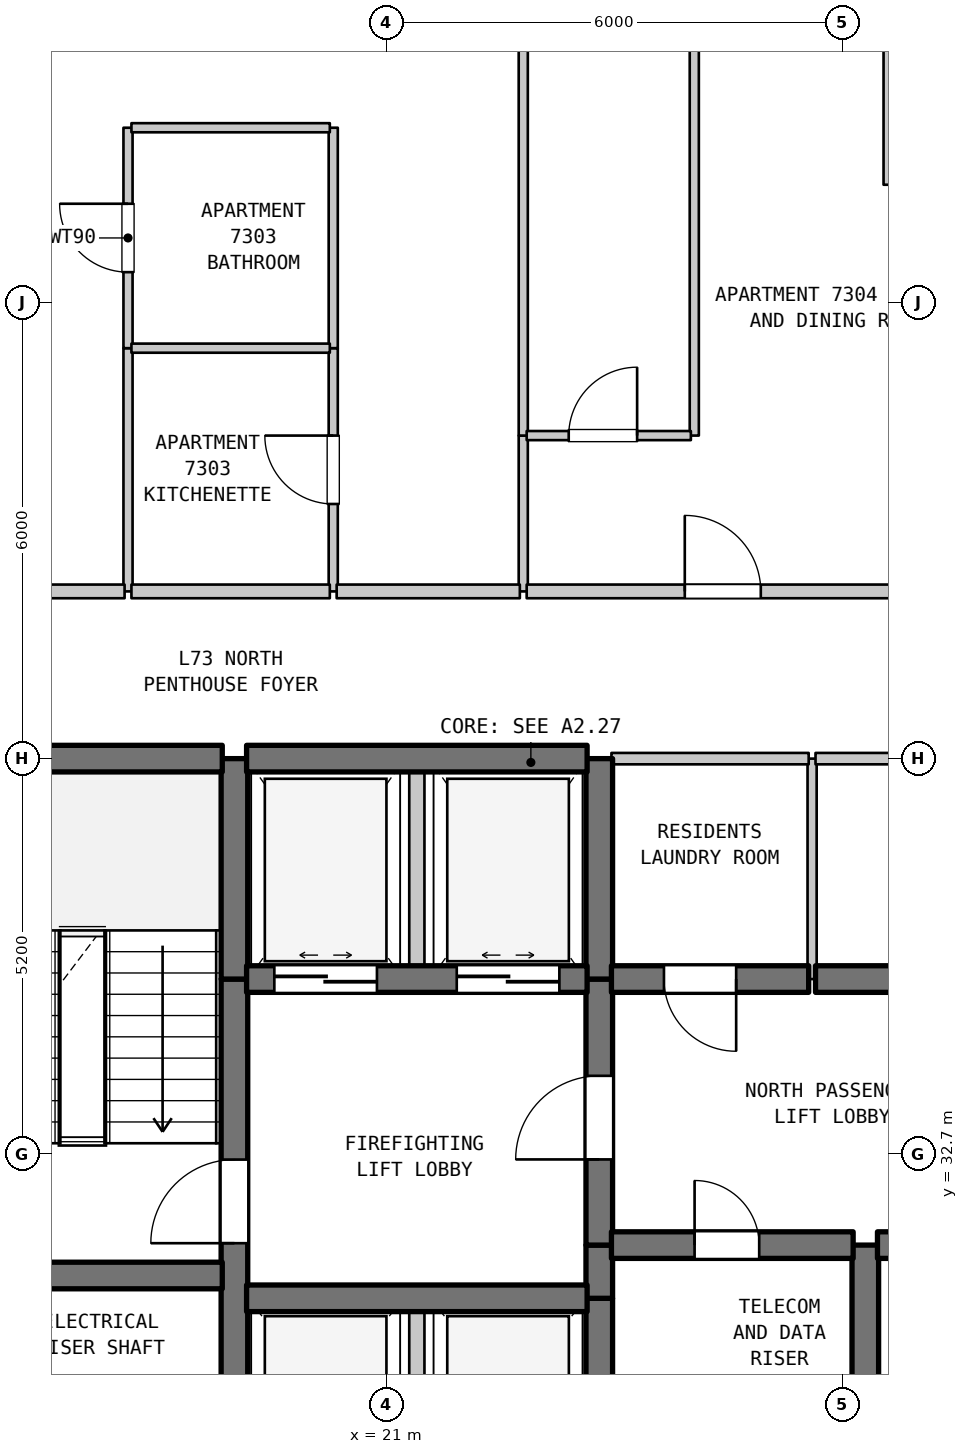
"""IFC4 building model, lengths in metres.
Left out: names, types, materials, properties, quantities, classifications, styles, units other than length and angle.
Written with IfcOpenShell. Run it as: python <this file> out.ifc"""

import sys

from ifc_helpers import new_model, si_unit, direction, frame, frame_2d, origin, place, context, subcontext, project, spatial, rectangle, extrude, element, fill, save


model = new_model("IFC4")
c1 = context("Model", 3, precision=1e-05, world=origin(), true_north=direction((0.0, 1.0)))
c2 = subcontext(c1, "Body", "Model", "MODEL_VIEW")
j1 = project(units=[si_unit("LENGTHUNIT", "METRE"), si_unit("PLANEANGLEUNIT", "RADIAN")], contexts=[c1])
p1 = place(None, origin())
s1 = spatial("IfcSite", under=j1, at=p1, CompositionType="ELEMENT")
p2 = place(p1, origin())
s2 = spatial("IfcBuilding", under=s1, at=p2, CompositionType="ELEMENT")
p3 = place(p2, frame((0.0, 0.0, 291.7)))
s3 = spatial("IfcBuildingStorey", under=s2, at=p3, CompositionType="ELEMENT", Elevation=291.7)
p4 = place(p3, frame((17.6, 40.1, 0.0), z_axis=(0.0, 0.0, 1.0), x_axis=(0.0, 1.0, 0.0)))
e1 = element("IfcWall", 1, at=p4, inside=s3, PredefinedType="PARTITIONING", context=c2, shape_type="SweptSolid", body=[
    extrude(rectangle(XDim=3.2, YDim=0.12, at=frame_2d((1.6, 0.0))), origin(), (0.0, 0.0, 1.0), 3.39),
])
p5 = place(p3, frame((17.6, 43.3, 0.0), z_axis=(0.0, 0.0, 1.0), x_axis=(0.0, 1.0, 0.0)))
e2 = element("IfcWall", 2, at=p5, inside=s3, PredefinedType="PARTITIONING", context=c2, shape_type="SweptSolid", body=[
    extrude(rectangle(XDim=2.9, YDim=0.12, at=frame_2d((1.45, 0.0))), origin(), (0.0, 0.0, 1.0), 3.39),
])
p6 = place(p5, frame((1.0, 0.0, 0.0)))
e3 = element("IfcOpeningElement", 3, at=p6, cuts=e2, PredefinedType="OPENING", context=c2, shape_type="SweptSolid", body=[
    extrude(rectangle(XDim=0.9, YDim=2.1, at=frame_2d((0.45, 1.05))), frame((0.0, 0.07, 0.0), z_axis=(0.0, -1.0, 0.0), x_axis=(1.0, 0.0, 0.0)), (0.0, 0.0, 1.0), 0.14),
])
p7 = place(p3, frame((19.0, 29.5, 0.0), z_axis=(0.0, 0.0, 1.0), x_axis=(0.0, 1.0, 0.0)))
e4 = element("IfcWall", 4, at=p7, inside=s3, PredefinedType="SHEAR", context=c2, shape_type="SweptSolid", body=[
    extrude(rectangle(XDim=5.5, YDim=0.35, at=frame_2d((2.75, 0.0))), origin(), (0.0, 0.0, 1.0), 3.39),
])
p8 = place(p7, frame((2.025, 0.0, 0.0)))
e5 = element("IfcOpeningElement", 5, at=p8, cuts=e4, PredefinedType="OPENING", context=c2, shape_type="SweptSolid", body=[
    extrude(rectangle(XDim=1.1, YDim=2.15, at=frame_2d((0.55, 1.075))), frame((0.0, 0.185, 0.0), z_axis=(0.0, -1.0, 0.0), x_axis=(1.0, 0.0, 0.0)), (0.0, 0.0, 1.0), 0.37),
])
p9 = place(p3, frame((19.0, 35.0, 0.0), z_axis=(0.0, 0.0, 1.0), x_axis=(0.0, 1.0, 0.0)))
e6 = element("IfcWall", 6, at=p9, inside=s3, PredefinedType="SHEAR", context=c2, shape_type="SweptSolid", body=[
    extrude(rectangle(XDim=2.9, YDim=0.35, at=frame_2d((1.45, 0.0))), origin(), (0.0, 0.0, 1.0), 3.39),
])
p10 = place(p3, frame((20.3, 40.1, 0.0), z_axis=(0.0, 0.0, 1.0), x_axis=(0.0, 1.0, 0.0)))
e7 = element("IfcWall", 7, at=p10, inside=s3, PredefinedType="PARTITIONING", context=c2, shape_type="SweptSolid", body=[
    extrude(rectangle(XDim=3.2, YDim=0.12, at=frame_2d((1.6, 0.0))), origin(), (0.0, 0.0, 1.0), 3.39),
])
p11 = place(p10, frame((1.15, 0.0, 0.0)))
e8 = element("IfcOpeningElement", 8, at=p11, cuts=e7, PredefinedType="OPENING", context=c2, shape_type="SweptSolid", body=[
    extrude(rectangle(XDim=0.9, YDim=2.15, at=frame_2d((0.45, 1.075))), frame((0.0, 0.07, 0.0), z_axis=(0.0, -1.0, 0.0), x_axis=(1.0, 0.0, 0.0)), (0.0, 0.0, 1.0), 0.14),
])
p12 = place(p3, frame((20.3, 43.3, 0.0), z_axis=(0.0, 0.0, 1.0), x_axis=(0.0, 1.0, 0.0)))
e9 = element("IfcWall", 9, at=p12, inside=s3, PredefinedType="PARTITIONING", context=c2, shape_type="SweptSolid", body=[
    extrude(rectangle(XDim=2.9, YDim=0.12, at=frame_2d((1.45, 0.0))), origin(), (0.0, 0.0, 1.0), 3.39),
])
p13 = place(p3, frame((21.4, 28.2, 0.0), z_axis=(0.0, 0.0, 1.0), x_axis=(0.0, 1.0, 0.0)))
e10 = element("IfcWall", 10, at=p13, inside=s3, PredefinedType="STANDARD", context=c2, shape_type="SweptSolid", body=[
    extrude(rectangle(XDim=2.6, YDim=0.2, at=frame_2d((1.3, 0.0))), origin(), (0.0, 0.0, 1.0), 3.39),
])
p14 = place(p3, frame((21.4, 35.0, 0.0), z_axis=(0.0, 0.0, 1.0), x_axis=(0.0, 1.0, 0.0)))
e11 = element("IfcWall", 11, at=p14, inside=s3, PredefinedType="STANDARD", context=c2, shape_type="SweptSolid", body=[
    extrude(rectangle(XDim=2.9, YDim=0.2, at=frame_2d((1.45, 0.0))), origin(), (0.0, 0.0, 1.0), 3.39),
])
p15 = place(p3, frame((22.8, 40.1, 0.0), z_axis=(0.0, 0.0, 1.0), x_axis=(0.0, 1.0, 0.0)))
e12 = element("IfcWall", 12, at=p15, inside=s3, PredefinedType="PARTITIONING", context=c2, shape_type="SweptSolid", body=[
    extrude(rectangle(XDim=2.05, YDim=0.12, at=frame_2d((1.025, 0.0))), origin(), (0.0, 0.0, 1.0), 3.39),
])
p16 = place(p3, frame((22.8, 42.15, 0.0), z_axis=(0.0, 0.0, 1.0), x_axis=(0.0, 1.0, 0.0)))
e13 = element("IfcWall", 13, at=p16, inside=s3, PredefinedType="PARTITIONING", context=c2, shape_type="SweptSolid", body=[
    extrude(rectangle(XDim=11.74, YDim=0.12, at=frame_2d((5.87, 0.0))), origin(), (0.0, 0.0, 1.0), 3.39),
])
p17 = place(p3, frame((23.8, 28.2, 0.0), z_axis=(0.0, 0.0, 1.0), x_axis=(0.0, 1.0, 0.0)))
e14 = element("IfcWall", 14, at=p17, inside=s3, PredefinedType="SHEAR", context=c2, shape_type="SweptSolid", body=[
    extrude(rectangle(XDim=2.6, YDim=0.35, at=frame_2d((1.3, 0.0))), origin(), (0.0, 0.0, 1.0), 3.39),
])
p18 = place(p3, frame((23.8, 30.8, 0.0), z_axis=(0.0, 0.0, 1.0), x_axis=(0.0, 1.0, 0.0)))
e15 = element("IfcWall", 15, at=p18, inside=s3, PredefinedType="SHEAR", context=c2, shape_type="SweptSolid", body=[
    extrude(rectangle(XDim=0.7, YDim=0.35, at=frame_2d((0.35, 0.0))), origin(), (0.0, 0.0, 1.0), 3.39),
])
p19 = place(p3, frame((23.8, 31.5, 0.0), z_axis=(0.0, 0.0, 1.0), x_axis=(0.0, 1.0, 0.0)))
e16 = element("IfcWall", 16, at=p19, inside=s3, PredefinedType="SHEAR", context=c2, shape_type="SweptSolid", body=[
    extrude(rectangle(XDim=3.5, YDim=0.35, at=frame_2d((1.75, 0.0))), origin(), (0.0, 0.0, 1.0), 3.39),
])
p20 = place(p19, frame((1.127, 0.0, 0.0)))
e17 = element("IfcOpeningElement", 17, at=p20, cuts=e16, PredefinedType="OPENING", context=c2, shape_type="SweptSolid", body=[
    extrude(rectangle(XDim=1.1, YDim=2.15, at=frame_2d((0.55, 1.075))), frame((0.0, 0.185, 0.0), z_axis=(0.0, -1.0, 0.0), x_axis=(1.0, 0.0, 0.0)), (0.0, 0.0, 1.0), 0.37),
])
p21 = place(p3, frame((23.8, 35.0, 0.0), z_axis=(0.0, 0.0, 1.0), x_axis=(0.0, 1.0, 0.0)))
e18 = element("IfcWall", 18, at=p21, inside=s3, PredefinedType="SHEAR", context=c2, shape_type="SweptSolid", body=[
    extrude(rectangle(XDim=2.9, YDim=0.35, at=frame_2d((1.45, 0.0))), origin(), (0.0, 0.0, 1.0), 3.39),
])
p22 = place(p3, frame((25.05, 42.15, 0.0), z_axis=(0.0, 0.0, 1.0), x_axis=(0.0, 1.0, 0.0)))
e19 = element("IfcWall", 19, at=p22, inside=s3, PredefinedType="PARTITIONING", context=c2, shape_type="SweptSolid", body=[
    extrude(rectangle(XDim=11.74, YDim=0.12, at=frame_2d((5.87, 0.0))), origin(), (0.0, 0.0, 1.0), 3.39),
])
p23 = place(p3, frame((26.6, 35.0, 0.0), z_axis=(0.0, 0.0, 1.0), x_axis=(0.0, 1.0, 0.0)))
e20 = element("IfcWall", 20, at=p23, inside=s3, PredefinedType="PARTITIONING", context=c2, shape_type="SweptSolid", body=[
    extrude(rectangle(XDim=2.9, YDim=0.12, at=frame_2d((1.45, 0.0))), origin(), (0.0, 0.0, 1.0), 3.39),
])
p24 = place(p3, frame((27.3, 28.9, 0.0), z_axis=(0.0, 0.0, 1.0), x_axis=(0.0, 1.0, 0.0)))
e21 = element("IfcWall", 21, at=p24, inside=s3, PredefinedType="SHEAR", context=c2, shape_type="SweptSolid", body=[
    extrude(rectangle(XDim=2.6, YDim=0.35, at=frame_2d((1.3, 0.0))), origin(), (0.0, 0.0, 1.0), 3.39),
])
p25 = place(p3, frame((27.6, 45.45, 0.0), z_axis=(0.0, 0.0, 1.0), x_axis=(0.0, 1.0, 0.0)))
e22 = element("IfcWall", 22, at=p25, inside=s3, PredefinedType="PARTITIONING", context=c2, shape_type="SweptSolid", body=[
    extrude(rectangle(XDim=8.44, YDim=0.12, at=frame_2d((4.22, 0.0))), origin(), (0.0, 0.0, 1.0), 3.39),
])
p26 = place(p3, frame((19.16, 30.8, 0.0), z_axis=(0.0, 0.0, 1.0), x_axis=(1.0, 0.0, 0.0)))
e23 = element("IfcWall", 23, at=p26, inside=s3, PredefinedType="SHEAR", context=c2, shape_type="SweptSolid", body=[
    extrude(rectangle(XDim=4.48, YDim=0.35, at=frame_2d((2.24, 0.0))), origin(), (0.0, 0.0, 1.0), 3.39),
])
p27 = place(p3, frame((15.16, 31.1, 0.0), z_axis=(0.0, 0.0, 1.0), x_axis=(1.0, 0.0, 0.0)))
e24 = element("IfcWall", 24, at=p27, inside=s3, PredefinedType="SHEAR", context=c2, shape_type="SweptSolid", body=[
    extrude(rectangle(XDim=3.68, YDim=0.35, at=frame_2d((1.84, 0.0))), origin(), (0.0, 0.0, 1.0), 3.39),
])
p28 = place(p3, frame((23.96, 31.5, 0.0), z_axis=(0.0, 0.0, 1.0), x_axis=(1.0, 0.0, 0.0)))
e25 = element("IfcWall", 25, at=p28, inside=s3, PredefinedType="SHEAR", context=c2, shape_type="SweptSolid", body=[
    extrude(rectangle(XDim=3.18, YDim=0.35, at=frame_2d((1.59, 0.0))), origin(), (0.0, 0.0, 1.0), 3.39),
])
p29 = place(p28, frame((1.094, 0.0, 0.0)))
e26 = element("IfcOpeningElement", 26, at=p29, cuts=e25, PredefinedType="OPENING", context=c2, shape_type="SweptSolid", body=[
    extrude(rectangle(XDim=0.85, YDim=2.1, at=frame_2d((0.425, 1.05))), frame((0.0, 0.185, 0.0), z_axis=(0.0, -1.0, 0.0), x_axis=(1.0, 0.0, 0.0)), (0.0, 0.0, 1.0), 0.37),
])
p30 = place(p3, frame((27.46, 31.5, 0.0), z_axis=(0.0, 0.0, 1.0), x_axis=(1.0, 0.0, 0.0)))
e27 = element("IfcWall", 27, at=p30, inside=s3, PredefinedType="SHEAR", context=c2, shape_type="SweptSolid", body=[
    extrude(rectangle(XDim=3.18, YDim=0.35, at=frame_2d((1.59, 0.0))), origin(), (0.0, 0.0, 1.0), 3.39),
])
p31 = place(p3, frame((19.16, 35.0, 0.0), z_axis=(0.0, 0.0, 1.0), x_axis=(1.0, 0.0, 0.0)))
e28 = element("IfcWall", 28, at=p31, inside=s3, PredefinedType="SHEAR", context=c2, shape_type="SweptSolid", body=[
    extrude(rectangle(XDim=4.48, YDim=0.35, at=frame_2d((2.24, 0.0))), origin(), (0.0, 0.0, 1.0), 3.39),
])
p32 = place(p31, frame((0.365, 0.0, 0.0)))
e29 = element("IfcOpeningElement", 29, at=p32, cuts=e28, PredefinedType="OPENING", context=c2, shape_type="SweptSolid", body=[
    extrude(rectangle(XDim=1.35, YDim=2.2, at=frame_2d((0.675, 1.1))), frame((0.0, 0.185, 0.0), z_axis=(0.0, -1.0, 0.0), x_axis=(1.0, 0.0, 0.0)), (0.0, 0.0, 1.0), 0.37),
])
p33 = place(p31, frame((2.765, 0.0, 0.0)))
e30 = element("IfcOpeningElement", 30, at=p33, cuts=e28, PredefinedType="OPENING", context=c2, shape_type="SweptSolid", body=[
    extrude(rectangle(XDim=1.35, YDim=2.2, at=frame_2d((0.675, 1.1))), frame((0.0, 0.185, 0.0), z_axis=(0.0, -1.0, 0.0), x_axis=(1.0, 0.0, 0.0)), (0.0, 0.0, 1.0), 0.37),
])
p34 = place(p3, frame((23.96, 35.0, 0.0), z_axis=(0.0, 0.0, 1.0), x_axis=(1.0, 0.0, 0.0)))
e31 = element("IfcWall", 31, at=p34, inside=s3, PredefinedType="SHEAR", context=c2, shape_type="SweptSolid", body=[
    extrude(rectangle(XDim=2.595, YDim=0.35, at=frame_2d((1.297, 0.0))), origin(), (0.0, 0.0, 1.0), 3.39),
])
p35 = place(p34, frame((0.691, 0.0, 0.0)))
e32 = element("IfcOpeningElement", 32, at=p35, cuts=e31, PredefinedType="OPENING", context=c2, shape_type="SweptSolid", body=[
    extrude(rectangle(XDim=0.95, YDim=2.15, at=frame_2d((0.475, 1.075))), frame((0.0, 0.185, 0.0), z_axis=(0.0, -1.0, 0.0), x_axis=(1.0, 0.0, 0.0)), (0.0, 0.0, 1.0), 0.37),
])
p36 = place(p3, frame((26.645, 35.0, 0.0), z_axis=(0.0, 0.0, 1.0), x_axis=(1.0, 0.0, 0.0)))
e33 = element("IfcWall", 33, at=p36, inside=s3, PredefinedType="SHEAR", context=c2, shape_type="SweptSolid", body=[
    extrude(rectangle(XDim=3.995, YDim=0.35, at=frame_2d((1.998, 0.0))), origin(), (0.0, 0.0, 1.0), 3.39),
])
p37 = place(p36, frame((1.508, 0.0, 0.0)))
e34 = element("IfcOpeningElement", 34, at=p37, cuts=e33, PredefinedType="OPENING", context=c2, shape_type="SweptSolid", body=[
    extrude(rectangle(XDim=0.95, YDim=2.15, at=frame_2d((0.475, 1.075))), frame((0.0, 0.185, 0.0), z_axis=(0.0, -1.0, 0.0), x_axis=(1.0, 0.0, 0.0)), (0.0, 0.0, 1.0), 0.37),
])
p38 = place(p3, frame((15.16, 37.9, 0.0), z_axis=(0.0, 0.0, 1.0), x_axis=(1.0, 0.0, 0.0)))
e35 = element("IfcWall", 35, at=p38, inside=s3, PredefinedType="SHEAR", context=c2, shape_type="SweptSolid", body=[
    extrude(rectangle(XDim=3.68, YDim=0.35, at=frame_2d((1.84, 0.0))), origin(), (0.0, 0.0, 1.0), 3.39),
])
p39 = place(p3, frame((19.16, 37.9, 0.0), z_axis=(0.0, 0.0, 1.0), x_axis=(1.0, 0.0, 0.0)))
e36 = element("IfcWall", 36, at=p39, inside=s3, PredefinedType="SHEAR", context=c2, shape_type="SweptSolid", body=[
    extrude(rectangle(XDim=4.48, YDim=0.35, at=frame_2d((2.24, 0.0))), origin(), (0.0, 0.0, 1.0), 3.39),
])
p40 = place(p3, frame((23.96, 37.9, 0.0), z_axis=(0.0, 0.0, 1.0), x_axis=(1.0, 0.0, 0.0)))
e37 = element("IfcWall", 37, at=p40, inside=s3, PredefinedType="STANDARD", context=c2, shape_type="SweptSolid", body=[
    extrude(rectangle(XDim=2.595, YDim=0.15, at=frame_2d((1.297, 0.0))), origin(), (0.0, 0.0, 1.0), 2.89),
])
p41 = place(p3, frame((26.645, 37.9, 0.0), z_axis=(0.0, 0.0, 1.0), x_axis=(1.0, 0.0, 0.0)))
e38 = element("IfcWall", 38, at=p41, inside=s3, PredefinedType="STANDARD", context=c2, shape_type="SweptSolid", body=[
    extrude(rectangle(XDim=4.095, YDim=0.15, at=frame_2d((2.047, 0.0))), origin(), (0.0, 0.0, 1.0), 2.89),
])
p42 = place(p3, frame((12.975, 40.1, 0.0), z_axis=(0.0, 0.0, 1.0), x_axis=(1.0, 0.0, 0.0)))
e39 = element("IfcWall", 39, at=p42, inside=s3, PredefinedType="STANDARD", context=c2, shape_type="SweptSolid", body=[
    extrude(rectangle(XDim=4.58, YDim=0.18, at=frame_2d((2.29, 0.0))), origin(), (0.0, 0.0, 1.0), 3.39),
])
p43 = place(p42, frame((1.775, 0.0, 0.0)))
e40 = element("IfcOpeningElement", 40, at=p43, cuts=e39, PredefinedType="OPENING", context=c2, shape_type="SweptSolid", body=[
    extrude(rectangle(XDim=1.0, YDim=2.15, at=frame_2d((0.5, 1.075))), frame((0.0, 0.1, 0.0), z_axis=(0.0, -1.0, 0.0), x_axis=(1.0, 0.0, 0.0)), (0.0, 0.0, 1.0), 0.2),
])
p44 = place(p3, frame((17.645, 40.1, 0.0), z_axis=(0.0, 0.0, 1.0), x_axis=(1.0, 0.0, 0.0)))
e41 = element("IfcWall", 41, at=p44, inside=s3, PredefinedType="STANDARD", context=c2, shape_type="SweptSolid", body=[
    extrude(rectangle(XDim=2.61, YDim=0.18, at=frame_2d((1.305, 0.0))), origin(), (0.0, 0.0, 1.0), 3.39),
])
p45 = place(p3, frame((20.345, 40.1, 0.0), z_axis=(0.0, 0.0, 1.0), x_axis=(1.0, 0.0, 0.0)))
e42 = element("IfcWall", 42, at=p45, inside=s3, PredefinedType="STANDARD", context=c2, shape_type="SweptSolid", body=[
    extrude(rectangle(XDim=2.41, YDim=0.18, at=frame_2d((1.205, 0.0))), origin(), (0.0, 0.0, 1.0), 3.39),
])
p46 = place(p3, frame((22.845, 40.1, 0.0), z_axis=(0.0, 0.0, 1.0), x_axis=(1.0, 0.0, 0.0)))
e43 = element("IfcWall", 43, at=p46, inside=s3, PredefinedType="STANDARD", context=c2, shape_type="SweptSolid", body=[
    extrude(rectangle(XDim=5.095, YDim=0.18, at=frame_2d((2.547, 0.0))), origin(), (0.0, 0.0, 1.0), 3.39),
])
p47 = place(p46, frame((2.08, 0.0, 0.0)))
e44 = element("IfcOpeningElement", 44, at=p47, cuts=e43, PredefinedType="OPENING", context=c2, shape_type="SweptSolid", body=[
    extrude(rectangle(XDim=1.0, YDim=2.15, at=frame_2d((0.5, 1.075))), frame((0.0, 0.1, 0.0), z_axis=(0.0, -1.0, 0.0), x_axis=(1.0, 0.0, 0.0)), (0.0, 0.0, 1.0), 0.2),
])
p48 = place(p3, frame((22.845, 42.15, 0.0), z_axis=(0.0, 0.0, 1.0), x_axis=(1.0, 0.0, 0.0)))
e45 = element("IfcWall", 45, at=p48, inside=s3, PredefinedType="PARTITIONING", context=c2, shape_type="SweptSolid", body=[
    extrude(rectangle(XDim=2.16, YDim=0.12, at=frame_2d((1.08, 0.0))), origin(), (0.0, 0.0, 1.0), 3.39),
])
p49 = place(p48, frame((0.553, 0.0, 0.0)))
e46 = element("IfcOpeningElement", 46, at=p49, cuts=e45, PredefinedType="OPENING", context=c2, shape_type="SweptSolid", body=[
    extrude(rectangle(XDim=0.9, YDim=2.15, at=frame_2d((0.45, 1.075))), frame((0.0, 0.07, 0.0), z_axis=(0.0, -1.0, 0.0), x_axis=(1.0, 0.0, 0.0)), (0.0, 0.0, 1.0), 0.14),
])
for number, where, z_axis, x_axis in (
    (47, (17.645, 43.3, 0.0), (0.0, 0.0, 1.0), (1.0, 0.0, 0.0)),
    (48, (17.645, 46.2, 0.0), (0.0, 0.0, 1.0), (1.0, 0.0, 0.0)),
):
    element("IfcWall", number, at=place(p3, frame(where, z_axis=z_axis, x_axis=x_axis)), inside=s3, PredefinedType="PARTITIONING", context=c2, shape_type="SweptSolid", body=[
        extrude(rectangle(XDim=2.61, YDim=0.12, at=frame_2d((1.305, 0.0))), origin(), (0.0, 0.0, 1.0), 3.39),
    ])
p50 = place(p6, origin())
e49 = element("IfcDoor", 49, at=p50, inside=s3, OperationType="SINGLE_SWING_RIGHT", PredefinedType="DOOR", context=c2, shape_type="SweptSolid", body=[
    extrude(rectangle(XDim=0.9, YDim=2.1, at=frame_2d((0.45, 1.05))), frame((0.0, 0.025, 0.0), z_axis=(0.0, -1.0, 0.0), x_axis=(1.0, 0.0, 0.0)), (0.0, 0.0, 1.0), 0.05),
])
fill(e3, e49)
p51 = place(p8, origin())
e50 = element("IfcDoor", 50, at=p51, inside=s3, OperationType="SINGLE_SWING_LEFT", PredefinedType="DOOR", context=c2, shape_type="SweptSolid", body=[
    extrude(rectangle(XDim=1.1, YDim=2.15, at=frame_2d((0.55, 1.075))), frame((0.0, 0.025, 0.0), z_axis=(0.0, -1.0, 0.0), x_axis=(1.0, 0.0, 0.0)), (0.0, 0.0, 1.0), 0.05),
])
fill(e5, e50)
p52 = place(p11, origin())
e51 = element("IfcDoor", 51, at=p52, inside=s3, OperationType="SINGLE_SWING_RIGHT", PredefinedType="DOOR", context=c2, shape_type="SweptSolid", body=[
    extrude(rectangle(XDim=0.9, YDim=2.15, at=frame_2d((0.45, 1.075))), frame((0.0, 0.025, 0.0), z_axis=(0.0, -1.0, 0.0), x_axis=(1.0, 0.0, 0.0)), (0.0, 0.0, 1.0), 0.05),
])
fill(e8, e51)
p53 = place(p20, origin())
e52 = element("IfcDoor", 52, at=p53, inside=s3, OperationType="SINGLE_SWING_LEFT", PredefinedType="DOOR", context=c2, shape_type="SweptSolid", body=[
    extrude(rectangle(XDim=1.1, YDim=2.15, at=frame_2d((0.55, 1.075))), frame((0.0, 0.025, 0.0), z_axis=(0.0, -1.0, 0.0), x_axis=(1.0, 0.0, 0.0)), (0.0, 0.0, 1.0), 0.05),
])
fill(e17, e52)
p54 = place(p29, origin())
e53 = element("IfcDoor", 53, at=p54, inside=s3, OperationType="SINGLE_SWING_LEFT", PredefinedType="DOOR", context=c2, shape_type="SweptSolid", body=[
    extrude(rectangle(XDim=0.85, YDim=2.1, at=frame_2d((0.425, 1.05))), frame((0.0, 0.025, 0.0), z_axis=(0.0, -1.0, 0.0), x_axis=(1.0, 0.0, 0.0)), (0.0, 0.0, 1.0), 0.05),
])
fill(e26, e53)
p55 = place(p32, origin())
e54 = element("IfcDoor", 54, at=p55, inside=s3, OperationType="DOUBLE_DOOR_SLIDING", PredefinedType="DOOR", context=c2, shape_type="SweptSolid", body=[
    extrude(rectangle(XDim=1.35, YDim=2.2, at=frame_2d((0.675, 1.1))), frame((0.0, 0.025, 0.0), z_axis=(0.0, -1.0, 0.0), x_axis=(1.0, 0.0, 0.0)), (0.0, 0.0, 1.0), 0.05),
])
fill(e29, e54)
p56 = place(p33, origin())
e55 = element("IfcDoor", 55, at=p56, inside=s3, OperationType="DOUBLE_DOOR_SLIDING", PredefinedType="DOOR", context=c2, shape_type="SweptSolid", body=[
    extrude(rectangle(XDim=1.35, YDim=2.2, at=frame_2d((0.675, 1.1))), frame((0.0, 0.025, 0.0), z_axis=(0.0, -1.0, 0.0), x_axis=(1.0, 0.0, 0.0)), (0.0, 0.0, 1.0), 0.05),
])
fill(e30, e55)
p57 = place(p35, frame((0.95, 0.0, 0.0), z_axis=(0.0, 0.0, 1.0), x_axis=(-1.0, 0.0, 0.0)))
e56 = element("IfcDoor", 56, at=p57, inside=s3, OperationType="SINGLE_SWING_RIGHT", PredefinedType="DOOR", context=c2, shape_type="SweptSolid", body=[
    extrude(rectangle(XDim=0.95, YDim=2.15, at=frame_2d((0.475, 1.075))), frame((0.0, 0.025, 0.0), z_axis=(0.0, -1.0, 0.0), x_axis=(1.0, 0.0, 0.0)), (0.0, 0.0, 1.0), 0.05),
])
fill(e32, e56)
p58 = place(p47, origin())
e57 = element("IfcDoor", 57, at=p58, inside=s3, OperationType="SINGLE_SWING_LEFT", PredefinedType="DOOR", context=c2, shape_type="SweptSolid", body=[
    extrude(rectangle(XDim=1.0, YDim=2.15, at=frame_2d((0.5, 1.075))), frame((0.0, 0.025, 0.0), z_axis=(0.0, -1.0, 0.0), x_axis=(1.0, 0.0, 0.0)), (0.0, 0.0, 1.0), 0.05),
])
fill(e44, e57)
p59 = place(p49, origin())
e58 = element("IfcDoor", 58, at=p59, inside=s3, OperationType="SINGLE_SWING_RIGHT", PredefinedType="DOOR", context=c2, shape_type="SweptSolid", body=[
    extrude(rectangle(XDim=0.9, YDim=2.15, at=frame_2d((0.45, 1.075))), frame((0.0, 0.025, 0.0), z_axis=(0.0, -1.0, 0.0), x_axis=(1.0, 0.0, 0.0)), (0.0, 0.0, 1.0), 0.05),
])
fill(e46, e58)
save(model, sys.argv[1])
